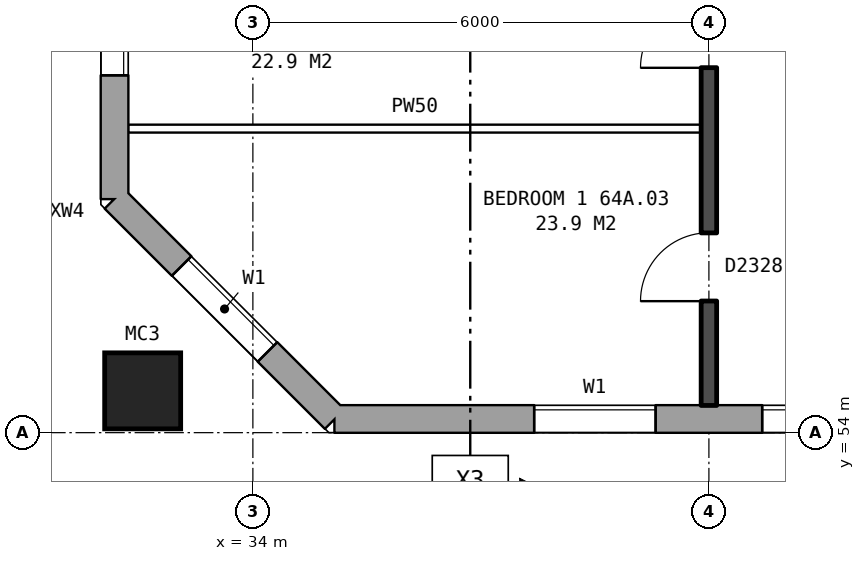
"""IFC4 building model, lengths in metres.
Left out: names, types, materials, properties, quantities, classifications, styles, units other than length and angle.
Written with IfcOpenShell. Run it as: python <this file> out.ifc"""

import sys

from ifc_helpers import new_model, si_unit, direction, frame, frame_2d, origin, origin_2d, place, context, subcontext, project, spatial, rectangle, hollow_rectangle, extrude, element, fill, save


model = new_model("IFC4")
c1 = context("Model", 3, precision=1e-05, world=origin(), true_north=direction((0.0, 1.0)))
c2 = subcontext(c1, "Body", "Model", "MODEL_VIEW")
j1 = project(units=[si_unit("LENGTHUNIT", "METRE"), si_unit("PLANEANGLEUNIT", "RADIAN")], contexts=[c1])
p1 = place(None, origin())
s1 = spatial("IfcSite", under=j1, at=p1, CompositionType="ELEMENT")
p2 = place(p1, origin())
s2 = spatial("IfcBuilding", under=s1, at=p2, CompositionType="ELEMENT")
p3 = place(p2, frame((0.0, 0.0, 227.6)))
s3 = spatial("IfcBuildingStorey", under=s2, at=p3, CompositionType="ELEMENT", Elevation=227.6)
p4 = place(p3, frame((32.55, 54.55, 0.0), z_axis=(0.0, 0.0, 1.0), x_axis=(1.0, 0.0, 0.0)))
e1 = element("IfcColumn", 1, at=p4, inside=s3, PredefinedType="COLUMN", context=c2, shape_type="SweptSolid", body=[
    extrude(hollow_rectangle(XDim=1.0, YDim=1.0, WallThickness=0.055, at=origin_2d()), origin(), (0.0, 0.0, 1.0), 3.1),
])
p5 = place(p3, frame((32.18, 57.075, 0.0), z_axis=(0.0, 0.0, 1.0), x_axis=(0.707106781187, -0.707106781187, 0.0)))
e2 = element("IfcWall", 2, at=p5, inside=s3, PredefinedType="STANDARD", context=c2, shape_type="SweptSolid", body=[
    extrude(rectangle(XDim=4.094, YDim=0.36, at=frame_2d((2.047, 0.0))), origin(), (0.0, 0.0, 1.0), 2.85),
])
p6 = place(p5, frame((1.247, 0.0, 0.8)))
e3 = element("IfcOpeningElement", 3, at=p6, cuts=e2, PredefinedType="OPENING", context=c2, shape_type="SweptSolid", body=[
    extrude(rectangle(XDim=1.6, YDim=1.8, at=frame_2d((0.8, 0.9))), frame((0.0, 0.19, 0.0), z_axis=(0.0, -1.0, 0.0), x_axis=(1.0, 0.0, 0.0)), (0.0, 0.0, 1.0), 0.38),
])
p7 = place(p3, frame((35.075, 54.18, 0.0), z_axis=(0.0, 0.0, 1.0), x_axis=(1.0, 0.0, 0.0)))
e4 = element("IfcWall", 4, at=p7, inside=s3, PredefinedType="STANDARD", context=c2, shape_type="SweptSolid", body=[
    extrude(rectangle(XDim=39.875, YDim=0.36, at=frame_2d((19.938, 0.0))), origin(), (0.0, 0.0, 1.0), 2.85),
])
p8 = place(p7, frame((2.625, 0.0, 0.8)))
e5 = element("IfcOpeningElement", 5, at=p8, cuts=e4, PredefinedType="OPENING", context=c2, shape_type="SweptSolid", body=[
    extrude(rectangle(XDim=1.6, YDim=1.8, at=frame_2d((0.8, 0.9))), frame((0.0, 0.19, 0.0), z_axis=(0.0, -1.0, 0.0), x_axis=(1.0, 0.0, 0.0)), (0.0, 0.0, 1.0), 0.38),
])
p9 = place(p7, frame((5.625, 0.0, 0.8)))
e6 = element("IfcOpeningElement", 6, at=p9, cuts=e4, PredefinedType="OPENING", context=c2, shape_type="SweptSolid", body=[
    extrude(rectangle(XDim=1.6, YDim=1.8, at=frame_2d((0.8, 0.9))), frame((0.0, 0.19, 0.0), z_axis=(0.0, -1.0, 0.0), x_axis=(1.0, 0.0, 0.0)), (0.0, 0.0, 1.0), 0.38),
])
p10 = place(p7, frame((8.625, 0.0, 0.8)))
e7 = element("IfcOpeningElement", 7, at=p10, cuts=e4, PredefinedType="OPENING", context=c2, shape_type="SweptSolid", body=[
    extrude(rectangle(XDim=1.6, YDim=1.8, at=frame_2d((0.8, 0.9))), frame((0.0, 0.19, 0.0), z_axis=(0.0, -1.0, 0.0), x_axis=(1.0, 0.0, 0.0)), (0.0, 0.0, 1.0), 0.38),
])
p11 = place(p7, frame((11.625, 0.0, 0.8)))
e8 = element("IfcOpeningElement", 8, at=p11, cuts=e4, PredefinedType="OPENING", context=c2, shape_type="SweptSolid", body=[
    extrude(rectangle(XDim=1.6, YDim=1.8, at=frame_2d((0.8, 0.9))), frame((0.0, 0.19, 0.0), z_axis=(0.0, -1.0, 0.0), x_axis=(1.0, 0.0, 0.0)), (0.0, 0.0, 1.0), 0.38),
])
p12 = place(p7, frame((14.625, 0.0, 0.35)))
e9 = element("IfcOpeningElement", 9, at=p12, cuts=e4, PredefinedType="OPENING", context=c2, shape_type="SweptSolid", body=[
    extrude(rectangle(XDim=0.6, YDim=0.9, at=frame_2d((0.3, 0.45))), frame((0.0, 0.19, 0.0), z_axis=(0.0, -1.0, 0.0), x_axis=(1.0, 0.0, 0.0)), (0.0, 0.0, 1.0), 0.38),
])
p13 = place(p7, frame((17.625, 0.0, 0.8)))
e10 = element("IfcOpeningElement", 10, at=p13, cuts=e4, PredefinedType="OPENING", context=c2, shape_type="SweptSolid", body=[
    extrude(rectangle(XDim=1.6, YDim=1.8, at=frame_2d((0.8, 0.9))), frame((0.0, 0.19, 0.0), z_axis=(0.0, -1.0, 0.0), x_axis=(1.0, 0.0, 0.0)), (0.0, 0.0, 1.0), 0.38),
])
p14 = place(p7, frame((20.625, 0.0, 0.8)))
e11 = element("IfcOpeningElement", 11, at=p14, cuts=e4, PredefinedType="OPENING", context=c2, shape_type="SweptSolid", body=[
    extrude(rectangle(XDim=1.6, YDim=1.8, at=frame_2d((0.8, 0.9))), frame((0.0, 0.19, 0.0), z_axis=(0.0, -1.0, 0.0), x_axis=(1.0, 0.0, 0.0)), (0.0, 0.0, 1.0), 0.38),
])
p15 = place(p7, frame((24.075, 0.0, 1.7)))
e12 = element("IfcOpeningElement", 12, at=p15, cuts=e4, PredefinedType="OPENING", context=c2, shape_type="SweptSolid", body=[
    extrude(rectangle(XDim=0.6, YDim=0.9, at=frame_2d((0.3, 0.45))), frame((0.0, 0.19, 0.0), z_axis=(0.0, -1.0, 0.0), x_axis=(1.0, 0.0, 0.0)), (0.0, 0.0, 1.0), 0.38),
])
p16 = place(p7, frame((26.625, 0.0, 0.8)))
e13 = element("IfcOpeningElement", 13, at=p16, cuts=e4, PredefinedType="OPENING", context=c2, shape_type="SweptSolid", body=[
    extrude(rectangle(XDim=1.6, YDim=1.8, at=frame_2d((0.8, 0.9))), frame((0.0, 0.19, 0.0), z_axis=(0.0, -1.0, 0.0), x_axis=(1.0, 0.0, 0.0)), (0.0, 0.0, 1.0), 0.38),
])
p17 = place(p7, frame((29.625, 0.0, 0.8)))
e14 = element("IfcOpeningElement", 14, at=p17, cuts=e4, PredefinedType="OPENING", context=c2, shape_type="SweptSolid", body=[
    extrude(rectangle(XDim=1.6, YDim=1.8, at=frame_2d((0.8, 0.9))), frame((0.0, 0.19, 0.0), z_axis=(0.0, -1.0, 0.0), x_axis=(1.0, 0.0, 0.0)), (0.0, 0.0, 1.0), 0.38),
])
p18 = place(p7, frame((32.625, 0.0, 0.8)))
e15 = element("IfcOpeningElement", 15, at=p18, cuts=e4, PredefinedType="OPENING", context=c2, shape_type="SweptSolid", body=[
    extrude(rectangle(XDim=1.6, YDim=1.8, at=frame_2d((0.8, 0.9))), frame((0.0, 0.19, 0.0), z_axis=(0.0, -1.0, 0.0), x_axis=(1.0, 0.0, 0.0)), (0.0, 0.0, 1.0), 0.38),
])
p19 = place(p7, frame((35.625, 0.0, 0.8)))
e16 = element("IfcOpeningElement", 16, at=p19, cuts=e4, PredefinedType="OPENING", context=c2, shape_type="SweptSolid", body=[
    extrude(rectangle(XDim=1.6, YDim=1.8, at=frame_2d((0.8, 0.9))), frame((0.0, 0.19, 0.0), z_axis=(0.0, -1.0, 0.0), x_axis=(1.0, 0.0, 0.0)), (0.0, 0.0, 1.0), 0.38),
])
p20 = place(p7, frame((15.525, 0.0, 0.75)))
e17 = element("IfcOpeningElement", 17, at=p20, cuts=e4, PredefinedType="OPENING", context=c2, shape_type="SweptSolid", body=[
    extrude(rectangle(XDim=1.2, YDim=1.8, at=frame_2d((0.6, 0.9))), frame((0.0, 0.19, 0.0), z_axis=(0.0, -1.0, 0.0), x_axis=(1.0, 0.0, 0.0)), (0.0, 0.0, 1.0), 0.38),
])
p21 = place(p7, frame((24.975, 0.0, 0.8)))
e18 = element("IfcOpeningElement", 18, at=p21, cuts=e4, PredefinedType="OPENING", context=c2, shape_type="SweptSolid", body=[
    extrude(rectangle(XDim=0.8, YDim=1.8, at=frame_2d((0.4, 0.9))), frame((0.0, 0.19, 0.0), z_axis=(0.0, -1.0, 0.0), x_axis=(1.0, 0.0, 0.0)), (0.0, 0.0, 1.0), 0.38),
])
p22 = place(p3, frame((32.18, 82.925, 0.0), z_axis=(0.0, 0.0, 1.0), x_axis=(0.0, -1.0, 0.0)))
e19 = element("IfcWall", 19, at=p22, inside=s3, PredefinedType="STANDARD", context=c2, shape_type="SweptSolid", body=[
    extrude(rectangle(XDim=25.851, YDim=0.36, at=frame_2d((12.925, 0.0))), origin(), (0.0, 0.0, 1.0), 2.85),
])
p23 = place(p22, frame((1.625, 0.0, 0.8)))
e20 = element("IfcOpeningElement", 20, at=p23, cuts=e19, PredefinedType="OPENING", context=c2, shape_type="SweptSolid", body=[
    extrude(rectangle(XDim=1.6, YDim=1.8, at=frame_2d((0.8, 0.9))), frame((0.0, 0.19, 0.0), z_axis=(0.0, -1.0, 0.0), x_axis=(1.0, 0.0, 0.0)), (0.0, 0.0, 1.0), 0.38),
])
p24 = place(p22, frame((4.425, 0.0, 1.7)))
e21 = element("IfcOpeningElement", 21, at=p24, cuts=e19, PredefinedType="OPENING", context=c2, shape_type="SweptSolid", body=[
    extrude(rectangle(XDim=0.6, YDim=0.9, at=frame_2d((0.3, 0.45))), frame((0.0, 0.19, 0.0), z_axis=(0.0, -1.0, 0.0), x_axis=(1.0, 0.0, 0.0)), (0.0, 0.0, 1.0), 0.38),
])
p25 = place(p22, frame((19.425, 0.0, 0.8)))
e22 = element("IfcOpeningElement", 22, at=p25, cuts=e19, PredefinedType="OPENING", context=c2, shape_type="SweptSolid", body=[
    extrude(rectangle(XDim=1.0, YDim=1.8, at=frame_2d((0.5, 0.9))), frame((0.0, 0.19, 0.0), z_axis=(0.0, -1.0, 0.0), x_axis=(1.0, 0.0, 0.0)), (0.0, 0.0, 1.0), 0.38),
])
p26 = place(p22, frame((22.625, 0.0, 0.8)))
e23 = element("IfcOpeningElement", 23, at=p26, cuts=e19, PredefinedType="OPENING", context=c2, shape_type="SweptSolid", body=[
    extrude(rectangle(XDim=1.6, YDim=1.8, at=frame_2d((0.8, 0.9))), frame((0.0, 0.19, 0.0), z_axis=(0.0, -1.0, 0.0), x_axis=(1.0, 0.0, 0.0)), (0.0, 0.0, 1.0), 0.38),
])
p27 = place(p22, frame((5.325, 0.0, 0.8)))
e24 = element("IfcOpeningElement", 24, at=p27, cuts=e19, PredefinedType="OPENING", context=c2, shape_type="SweptSolid", body=[
    extrude(rectangle(XDim=1.0, YDim=1.8, at=frame_2d((0.5, 0.9))), frame((0.0, 0.19, 0.0), z_axis=(0.0, -1.0, 0.0), x_axis=(1.0, 0.0, 0.0)), (0.0, 0.0, 1.0), 0.38),
])
p28 = place(p22, frame((20.725, 0.0, 1.6)))
e25 = element("IfcOpeningElement", 25, at=p28, cuts=e19, PredefinedType="OPENING", context=c2, shape_type="SweptSolid", body=[
    extrude(rectangle(XDim=0.6, YDim=0.9, at=frame_2d((0.3, 0.45))), frame((0.0, 0.19, 0.0), z_axis=(0.0, -1.0, 0.0), x_axis=(1.0, 0.0, 0.0)), (0.0, 0.0, 1.0), 0.38),
])
p29 = place(p3, frame((32.36, 58.0, 0.0), z_axis=(0.0, 0.0, 1.0), x_axis=(1.0, 0.0, 0.0)))
e26 = element("IfcWall", 26, at=p29, inside=s3, PredefinedType="PARTITIONING", context=c2, shape_type="SweptSolid", body=[
    extrude(rectangle(XDim=7.54, YDim=0.1, at=frame_2d((3.77, 0.0))), origin(), (0.0, 0.0, 1.0), 2.85),
])
p30 = place(p3, frame((40.0, 54.36, 0.0), z_axis=(0.0, 0.0, 1.0), x_axis=(0.0, 1.0, 0.0)))
e27 = element("IfcWall", 27, at=p30, inside=s3, PredefinedType="SOLIDWALL", context=c2, shape_type="SweptSolid", body=[
    extrude(rectangle(XDim=9.44, YDim=0.2, at=frame_2d((4.72, 0.0))), origin(), (0.0, 0.0, 1.0), 2.85),
])
p31 = place(p30, frame((1.37, 0.0, 0.0)))
e28 = element("IfcOpeningElement", 28, at=p31, cuts=e27, PredefinedType="OPENING", context=c2, shape_type="SweptSolid", body=[
    extrude(rectangle(XDim=0.9, YDim=2.1, at=frame_2d((0.45, 1.05))), frame((0.0, 0.11, 0.0), z_axis=(0.0, -1.0, 0.0), x_axis=(1.0, 0.0, 0.0)), (0.0, 0.0, 1.0), 0.22),
])
p32 = place(p30, frame((4.44, 0.0, 0.0)))
e29 = element("IfcOpeningElement", 29, at=p32, cuts=e27, PredefinedType="OPENING", context=c2, shape_type="SweptSolid", body=[
    extrude(rectangle(XDim=0.9, YDim=2.1, at=frame_2d((0.45, 1.05))), frame((0.0, 0.11, 0.0), z_axis=(0.0, -1.0, 0.0), x_axis=(1.0, 0.0, 0.0)), (0.0, 0.0, 1.0), 0.22),
])
p33 = place(p30, frame((7.59, 0.0, 0.0)))
e30 = element("IfcOpeningElement", 30, at=p33, cuts=e27, PredefinedType="OPENING", context=c2, shape_type="SweptSolid", body=[
    extrude(rectangle(XDim=0.9, YDim=2.1, at=frame_2d((0.45, 1.05))), frame((0.0, 0.11, 0.0), z_axis=(0.0, -1.0, 0.0), x_axis=(1.0, 0.0, 0.0)), (0.0, 0.0, 1.0), 0.22),
])
p34 = place(p6, origin())
e31 = element("IfcWindow", 31, at=p34, inside=s3, PartitioningType="SINGLE_PANEL", PredefinedType="WINDOW", context=c2, shape_type="SweptSolid", body=[
    extrude(rectangle(XDim=1.6, YDim=1.8, at=frame_2d((0.8, 0.9))), frame((0.0, 0.15, 0.0), z_axis=(0.0, -1.0, 0.0), x_axis=(1.0, 0.0, 0.0)), (0.0, 0.0, 1.0), 0.06),
])
fill(e3, e31)
p35 = place(p8, origin())
e32 = element("IfcWindow", 32, at=p35, inside=s3, PartitioningType="SINGLE_PANEL", PredefinedType="WINDOW", context=c2, shape_type="SweptSolid", body=[
    extrude(rectangle(XDim=1.6, YDim=1.8, at=frame_2d((0.8, 0.9))), frame((0.0, 0.15, 0.0), z_axis=(0.0, -1.0, 0.0), x_axis=(1.0, 0.0, 0.0)), (0.0, 0.0, 1.0), 0.06),
])
fill(e5, e32)
p36 = place(p9, origin())
e33 = element("IfcWindow", 33, at=p36, inside=s3, PartitioningType="SINGLE_PANEL", PredefinedType="WINDOW", context=c2, shape_type="SweptSolid", body=[
    extrude(rectangle(XDim=1.6, YDim=1.8, at=frame_2d((0.8, 0.9))), frame((0.0, 0.15, 0.0), z_axis=(0.0, -1.0, 0.0), x_axis=(1.0, 0.0, 0.0)), (0.0, 0.0, 1.0), 0.06),
])
fill(e6, e33)
p37 = place(p26, origin())
e34 = element("IfcWindow", 34, at=p37, inside=s3, PartitioningType="SINGLE_PANEL", PredefinedType="WINDOW", context=c2, shape_type="SweptSolid", body=[
    extrude(rectangle(XDim=1.6, YDim=1.8, at=frame_2d((0.8, 0.9))), frame((0.0, 0.15, 0.0), z_axis=(0.0, -1.0, 0.0), x_axis=(1.0, 0.0, 0.0)), (0.0, 0.0, 1.0), 0.06),
])
fill(e23, e34)
p38 = place(p31, origin())
e35 = element("IfcDoor", 35, at=p38, inside=s3, OperationType="SINGLE_SWING_LEFT", PredefinedType="DOOR", context=c2, shape_type="SweptSolid", body=[
    extrude(rectangle(XDim=0.9, YDim=2.1, at=frame_2d((0.45, 1.05))), frame((0.0, 0.025, 0.0), z_axis=(0.0, -1.0, 0.0), x_axis=(1.0, 0.0, 0.0)), (0.0, 0.0, 1.0), 0.05),
])
fill(e28, e35)
p39 = place(p32, origin())
e36 = element("IfcDoor", 36, at=p39, inside=s3, OperationType="SINGLE_SWING_LEFT", PredefinedType="DOOR", context=c2, shape_type="SweptSolid", body=[
    extrude(rectangle(XDim=0.9, YDim=2.1, at=frame_2d((0.45, 1.05))), frame((0.0, 0.025, 0.0), z_axis=(0.0, -1.0, 0.0), x_axis=(1.0, 0.0, 0.0)), (0.0, 0.0, 1.0), 0.05),
])
fill(e29, e36)
save(model, sys.argv[1])
